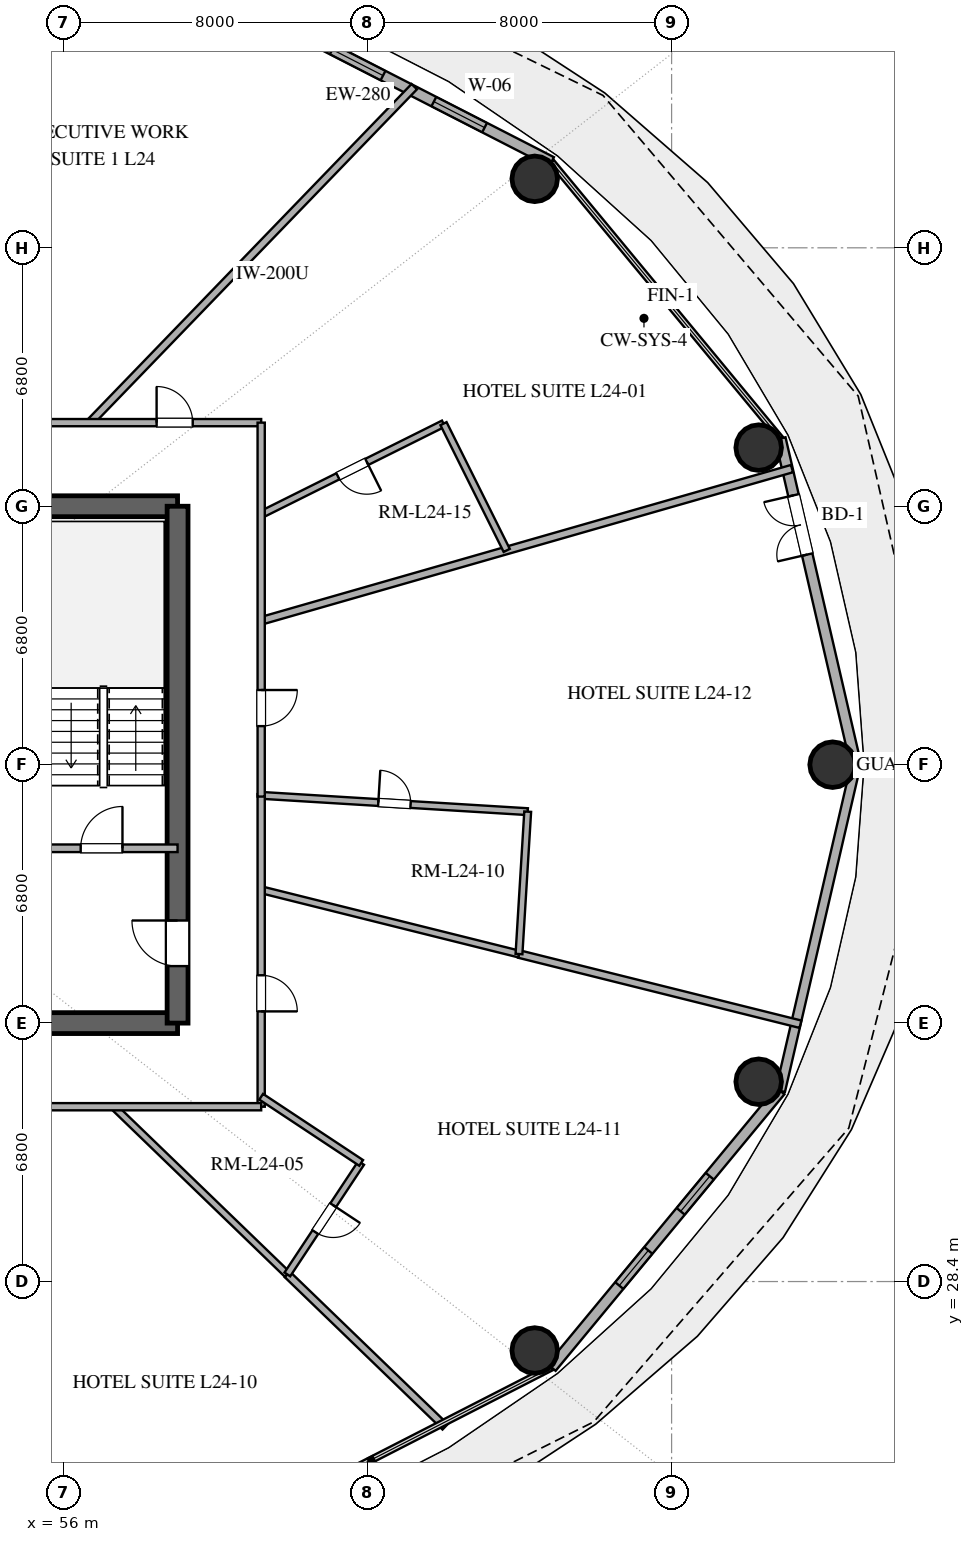
"""IFC4 building model, lengths in metres.
Left out: names, types, materials, properties, quantities, classifications, styles, units other than length and angle.
Written with IfcOpenShell. Run it as: python <this file> out.ifc"""

import sys

from ifc_helpers import new_model, si_unit, direction, frame, frame_2d, origin, origin_2d, place, context, subcontext, project, spatial, rectangle, hollow_circle, extrude, element, fill, save


model = new_model("IFC4")
c1 = context("Model", 3, precision=1e-05, world=origin(), true_north=direction((0.0, 1.0)))
c2 = subcontext(c1, "Body", "Model", "MODEL_VIEW")
j1 = project(units=[si_unit("LENGTHUNIT", "METRE"), si_unit("PLANEANGLEUNIT", "RADIAN")], contexts=[c1])
p1 = place(None, origin())
s1 = spatial("IfcSite", under=j1, at=p1, CompositionType="ELEMENT")
p2 = place(p1, origin())
s2 = spatial("IfcBuilding", under=s1, at=p2, CompositionType="ELEMENT")
p3 = place(p2, frame((0.0, 0.0, 98.4)))
s3 = spatial("IfcBuildingStorey", under=s2, at=p3, CompositionType="ELEMENT", Elevation=98.4)
for number, where, z_axis, x_axis in (
    (1, (55.0, 35.2, 0.0), (0.0, 0.0, 1.0), (1.0, 0.0, 0.0)),
    (2, (55.0, 48.8, 0.0), (0.0, 0.0, 1.0), (1.0, 0.0, 0.0)),
):
    element("IfcWall", number, at=place(p3, frame(where, z_axis=z_axis, x_axis=x_axis)), inside=s3, PredefinedType="SHEAR", context=c2, shape_type="SweptSolid", body=[
        extrude(rectangle(XDim=4.0, YDim=0.55, at=frame_2d((2.0, 0.0))), origin(), (0.0, 0.0, 1.0), 3.38),
    ])
p4 = place(p3, frame((59.0, 35.2, 0.0), z_axis=(0.0, 0.0, 1.0), x_axis=(0.0, 1.0, 0.0)))
e3 = element("IfcWall", 3, at=p4, inside=s3, PredefinedType="SHEAR", context=c2, shape_type="SweptSolid", body=[
    extrude(rectangle(XDim=13.6, YDim=0.55, at=frame_2d((6.8, 0.0))), origin(), (0.0, 0.0, 1.0), 3.38),
])
p5 = place(p4, frame((1.5, 0.0, 0.0)))
e4 = element("IfcOpeningElement", 4, at=p5, cuts=e3, PredefinedType="OPENING", context=c2, shape_type="SweptSolid", body=[
    extrude(rectangle(XDim=1.2, YDim=2.15, at=frame_2d((0.6, 1.075))), frame((0.0, 0.285, 0.0), z_axis=(0.0, -1.0, 0.0), x_axis=(1.0, 0.0, 0.0)), (0.0, 0.0, 1.0), 0.57),
])
for number, where, z_axis, x_axis in (
    (5, (76.237, 42.0, 0.0), (0.0, 0.0, 1.0), (1.0, 0.0, 0.0)),
    (6, (74.291, 50.343, 0.0), (0.0, 0.0, 1.0), (1.0, 0.0, 0.0)),
    (7, (68.398, 57.415, 0.0), (0.0, 0.0, 1.0), (1.0, 0.0, 0.0)),
    (8, (68.398, 26.585, 0.0), (0.0, 0.0, 1.0), (1.0, 0.0, 0.0)),
    (9, (74.291, 33.657, 0.0), (0.0, 0.0, 1.0), (1.0, 0.0, 0.0)),
):
    element("IfcColumn", number, at=place(p3, frame(where, z_axis=z_axis, x_axis=x_axis)), inside=s3, PredefinedType="COLUMN", context=c2, shape_type="SweptSolid", body=[
        extrude(hollow_circle(Radius=0.6, WallThickness=0.032, at=origin_2d()), origin(), (0.0, 0.0, 1.0), 3.38),
    ])
p6 = place(p3, frame((76.849, 42.0, 0.0), z_axis=(0.0, 0.0, 1.0), x_axis=(-0.22558597182, 0.974223264616, 0.0)))
e10 = element("IfcWall", 10, at=p6, inside=s3, PredefinedType="SOLIDWALL", context=c2, shape_type="SweptSolid", body=[
    extrude(rectangle(XDim=8.811, YDim=0.28, at=frame_2d((4.405, 0.0))), origin(), (0.0, 0.0, 1.0), 3.38),
])
p7 = place(p6, frame((5.675, 0.0, 0.0)))
e11 = element("IfcOpeningElement", 11, at=p7, cuts=e10, PredefinedType="OPENING", context=c2, shape_type="SweptSolid", body=[
    extrude(rectangle(XDim=1.6, YDim=2.25, at=frame_2d((0.8, 1.125))), frame((0.0, 0.15, 0.0), z_axis=(0.0, -1.0, 0.0), x_axis=(1.0, 0.0, 0.0)), (0.0, 0.0, 1.0), 0.3),
])
p8 = place(p3, frame((68.84, 57.86, 0.0), z_axis=(0.0, 0.0, 1.0), x_axis=(-0.889959505023, 0.45603955905, 0.0)))
e12 = element("IfcWall", 12, at=p8, inside=s3, PredefinedType="SOLIDWALL", context=c2, shape_type="SweptSolid", body=[
    extrude(rectangle(XDim=10.662, YDim=0.28, at=frame_2d((5.331, 0.0))), origin(), (0.0, 0.0, 1.0), 3.38),
])
p9 = place(p8, frame((1.979, 0.0, 0.85)))
e13 = element("IfcOpeningElement", 13, at=p9, cuts=e12, PredefinedType="OPENING", context=c2, shape_type="SweptSolid", body=[
    extrude(rectangle(XDim=1.5, YDim=2.0, at=frame_2d((0.75, 1.0))), frame((0.0, 0.15, 0.0), z_axis=(0.0, -1.0, 0.0), x_axis=(1.0, 0.0, 0.0)), (0.0, 0.0, 1.0), 0.3),
])
p10 = place(p8, frame((4.982, 0.0, 0.85)))
e14 = element("IfcOpeningElement", 14, at=p10, cuts=e12, PredefinedType="OPENING", context=c2, shape_type="SweptSolid", body=[
    extrude(rectangle(XDim=1.5, YDim=1.8, at=frame_2d((0.75, 0.9))), frame((0.0, 0.15, 0.0), z_axis=(0.0, -1.0, 0.0), x_axis=(1.0, 0.0, 0.0)), (0.0, 0.0, 1.0), 0.3),
])
p11 = place(p8, frame((7.096, 0.0, 0.85)))
e15 = element("IfcOpeningElement", 15, at=p11, cuts=e12, PredefinedType="OPENING", context=c2, shape_type="SweptSolid", body=[
    extrude(rectangle(XDim=1.5, YDim=1.8, at=frame_2d((0.75, 0.9))), frame((0.0, 0.15, 0.0), z_axis=(0.0, -1.0, 0.0), x_axis=(1.0, 0.0, 0.0)), (0.0, 0.0, 1.0), 0.3),
])
p12 = place(p3, frame((68.84, 26.14, 0.0), z_axis=(0.0, 0.0, 1.0), x_axis=(0.637505817448, 0.770445541696, 0.0)))
e16 = element("IfcWall", 16, at=p12, inside=s3, PredefinedType="SOLIDWALL", context=c2, shape_type="SweptSolid", body=[
    extrude(rectangle(XDim=9.445, YDim=0.28, at=frame_2d((4.723, 0.0))), origin(), (0.0, 0.0, 1.0), 3.38),
])
p13 = place(p12, frame((2.797, 0.0, 0.85)))
e17 = element("IfcOpeningElement", 17, at=p13, cuts=e16, PredefinedType="OPENING", context=c2, shape_type="SweptSolid", body=[
    extrude(rectangle(XDim=1.2, YDim=1.6, at=frame_2d((0.6, 0.8))), frame((0.0, 0.15, 0.0), z_axis=(0.0, -1.0, 0.0), x_axis=(1.0, 0.0, 0.0)), (0.0, 0.0, 1.0), 0.3),
])
p14 = place(p12, frame((5.332, 0.0, 0.85)))
e18 = element("IfcOpeningElement", 18, at=p14, cuts=e16, PredefinedType="OPENING", context=c2, shape_type="SweptSolid", body=[
    extrude(rectangle(XDim=1.2, YDim=1.6, at=frame_2d((0.6, 0.8))), frame((0.0, 0.15, 0.0), z_axis=(0.0, -1.0, 0.0), x_axis=(1.0, 0.0, 0.0)), (0.0, 0.0, 1.0), 0.3),
])
p15 = place(p3, frame((74.861, 33.417, 0.0), z_axis=(0.0, 0.0, 1.0), x_axis=(0.22558597182, 0.974223264616, 0.0)))
e19 = element("IfcWall", 19, at=p15, inside=s3, PredefinedType="SOLIDWALL", context=c2, shape_type="SweptSolid", body=[
    extrude(rectangle(XDim=8.811, YDim=0.25, at=frame_2d((4.405, 0.0))), origin(), (0.0, 0.0, 1.0), 3.38),
])
p16 = place(p3, frame((55.0, 39.8, 0.0), z_axis=(0.0, 0.0, 1.0), x_axis=(1.0, 0.0, 0.0)))
e20 = element("IfcWall", 20, at=p16, inside=s3, PredefinedType="SOLIDWALL", context=c2, shape_type="SweptSolid", body=[
    extrude(rectangle(XDim=4.0, YDim=0.2, at=frame_2d((2.0, 0.0))), origin(), (0.0, 0.0, 1.0), 2.74),
])
p17 = place(p16, frame((1.45, 0.0, 0.0)))
e21 = element("IfcOpeningElement", 21, at=p17, cuts=e20, PredefinedType="OPENING", context=c2, shape_type="SweptSolid", body=[
    extrude(rectangle(XDim=1.1, YDim=2.15, at=frame_2d((0.55, 1.075))), frame((0.0, 0.11, 0.0), z_axis=(0.0, -1.0, 0.0), x_axis=(1.0, 0.0, 0.0)), (0.0, 0.0, 1.0), 0.22),
])
p18 = place(p3, frame((65.228, 59.84, 0.0), z_axis=(0.0, 0.0, 1.0), x_axis=(-0.694672506389, -0.719326149161, 0.0)))
e22 = element("IfcWall", 22, at=p18, inside=s3, PredefinedType="PARTITIONING", context=c2, shape_type="SweptSolid", body=[
    extrude(rectangle(XDim=12.289, YDim=0.2, at=frame_2d((6.145, 0.0))), origin(), (0.0, 0.0, 1.0), 2.74),
])
p19 = place(p3, frame((61.2, 45.785, 0.0), z_axis=(0.0, 0.0, 1.0), x_axis=(0.961261030421, 0.275639676741, 0.0)))
e23 = element("IfcWall", 23, at=p19, inside=s3, PredefinedType="PARTITIONING", context=c2, shape_type="SweptSolid", body=[
    extrude(rectangle(XDim=14.531, YDim=0.2, at=frame_2d((7.266, 0.0))), origin(), (0.0, 0.0, 1.0), 2.74),
])
p20 = place(p3, frame((75.391, 35.171, 0.0), z_axis=(0.0, 0.0, 1.0), x_axis=(-0.970302209845, 0.241895889938, 0.0)))
e24 = element("IfcWall", 24, at=p20, inside=s3, PredefinedType="PARTITIONING", context=c2, shape_type="SweptSolid", body=[
    extrude(rectangle(XDim=7.633, YDim=0.2, at=frame_2d((3.817, 0.0))), origin(), (0.0, 0.0, 1.0), 2.74),
])
p21 = place(p3, frame((61.2, 41.193, 0.0), z_axis=(0.0, 0.0, 1.0), x_axis=(0.998134708281, -0.061050013314, 0.0)))
e25 = element("IfcWall", 25, at=p21, inside=s3, PredefinedType="PLUMBINGWALL", context=c2, shape_type="SweptSolid", body=[
    extrude(rectangle(XDim=7.026, YDim=0.18, at=frame_2d((3.513, 0.0))), origin(), (0.0, 0.0, 1.0), 2.74),
])
p22 = place(p21, frame((3.088, 0.0, 0.0)))
e26 = element("IfcOpeningElement", 26, at=p22, cuts=e25, PredefinedType="OPENING", context=c2, shape_type="SweptSolid", body=[
    extrude(rectangle(XDim=0.85, YDim=2.1, at=frame_2d((0.425, 1.05))), frame((0.0, 0.1, 0.0), z_axis=(0.0, -1.0, 0.0), x_axis=(1.0, 0.0, 0.0)), (0.0, 0.0, 1.0), 0.2),
])
p23 = place(p3, frame((67.984, 37.017, 0.0), z_axis=(0.0, 0.0, 1.0), x_axis=(-0.970290206094, 0.241944034764, 0.0)))
e27 = element("IfcWall", 27, at=p23, inside=s3, PredefinedType="PLUMBINGWALL", context=c2, shape_type="SweptSolid", body=[
    extrude(rectangle(XDim=6.992, YDim=0.18, at=frame_2d((3.496, 0.0))), origin(), (0.0, 0.0, 1.0), 2.74),
])
p24 = place(p3, frame((48.518, 51.0, 0.0), z_axis=(0.0, 0.0, 1.0), x_axis=(1.0, 0.0, 0.0)))
e28 = element("IfcWall", 28, at=p24, inside=s3, PredefinedType="PARTITIONING", context=c2, shape_type="SweptSolid", body=[
    extrude(rectangle(XDim=12.682, YDim=0.19, at=frame_2d((6.341, 0.0))), origin(), (0.0, 0.0, 1.0), 2.74),
])
p25 = place(p24, frame((4.455, 0.0, 0.0)))
e29 = element("IfcOpeningElement", 29, at=p25, cuts=e28, PredefinedType="OPENING", context=c2, shape_type="SweptSolid", body=[
    extrude(rectangle(XDim=1.0, YDim=2.2, at=frame_2d((0.5, 1.1))), frame((0.0, 0.105, 0.0), z_axis=(0.0, -1.0, 0.0), x_axis=(1.0, 0.0, 0.0)), (0.0, 0.0, 1.0), 0.21),
])
p26 = place(p24, frame((9.93, 0.0, 0.0)))
e30 = element("IfcOpeningElement", 30, at=p26, cuts=e28, PredefinedType="OPENING", context=c2, shape_type="SweptSolid", body=[
    extrude(rectangle(XDim=0.95, YDim=2.15, at=frame_2d((0.475, 1.075))), frame((0.0, 0.105, 0.0), z_axis=(0.0, -1.0, 0.0), x_axis=(1.0, 0.0, 0.0)), (0.0, 0.0, 1.0), 0.21),
])
p27 = place(p3, frame((61.889, 28.587, 0.0), z_axis=(0.0, 0.0, 1.0), x_axis=(-0.719318009274, 0.694680935059, 0.0)))
e31 = element("IfcWall", 31, at=p27, inside=s3, PredefinedType="PLUMBINGWALL", context=c2, shape_type="SweptSolid", body=[
    extrude(rectangle(XDim=6.352, YDim=0.18, at=frame_2d((3.176, 0.0))), origin(), (0.0, 0.0, 1.0), 2.74),
])
p28 = place(p3, frame((66.041, 24.578, 0.0), z_axis=(0.0, 0.0, 1.0), x_axis=(-0.719370121813, 0.694626970281, 0.0)))
e32 = element("IfcWall", 32, at=p28, inside=s3, PredefinedType="PARTITIONING", context=c2, shape_type="SweptSolid", body=[
    extrude(rectangle(XDim=5.772, YDim=0.2, at=frame_2d((2.886, 0.0))), origin(), (0.0, 0.0, 1.0), 2.74),
])
p29 = place(p3, frame((61.2, 41.225, 0.0), z_axis=(0.0, 0.0, 1.0), x_axis=(0.0, -1.0, 0.0)))
e33 = element("IfcWall", 33, at=p29, inside=s3, PredefinedType="PARTITIONING", context=c2, shape_type="SweptSolid", body=[
    extrude(rectangle(XDim=8.225, YDim=0.19, at=frame_2d((4.112, 0.0))), origin(), (0.0, 0.0, 1.0), 2.74),
])
p30 = place(p29, frame((4.767, 0.0, 0.0)))
e34 = element("IfcOpeningElement", 34, at=p30, cuts=e33, PredefinedType="OPENING", context=c2, shape_type="SweptSolid", body=[
    extrude(rectangle(XDim=0.95, YDim=2.15, at=frame_2d((0.475, 1.075))), frame((0.0, 0.105, 0.0), z_axis=(0.0, -1.0, 0.0), x_axis=(1.0, 0.0, 0.0)), (0.0, 0.0, 1.0), 0.21),
])
p31 = place(p3, frame((65.998, 50.973, 0.0), z_axis=(0.0, 0.0, 1.0), x_axis=(-0.894936648514, -0.446193226244, 0.0)))
e35 = element("IfcWall", 35, at=p31, inside=s3, PredefinedType="PLUMBINGWALL", context=c2, shape_type="SweptSolid", body=[
    extrude(rectangle(XDim=5.361, YDim=0.18, at=frame_2d((2.681, 0.0))), origin(), (0.0, 0.0, 1.0), 2.74),
])
p32 = place(p31, frame((2.256, 0.0, 0.0)))
e36 = element("IfcOpeningElement", 36, at=p32, cuts=e35, PredefinedType="OPENING", context=c2, shape_type="SweptSolid", body=[
    extrude(rectangle(XDim=0.85, YDim=2.1, at=frame_2d((0.425, 1.05))), frame((0.0, 0.1, 0.0), z_axis=(0.0, -1.0, 0.0), x_axis=(1.0, 0.0, 0.0)), (0.0, 0.0, 1.0), 0.2),
])
p33 = place(p3, frame((61.2, 33.0, 0.0), z_axis=(0.0, 0.0, 1.0), x_axis=(-1.0, 0.0, 0.0)))
e37 = element("IfcWall", 37, at=p33, inside=s3, PredefinedType="PARTITIONING", context=c2, shape_type="SweptSolid", body=[
    extrude(rectangle(XDim=10.653, YDim=0.19, at=frame_2d((5.326, 0.0))), origin(), (0.0, 0.0, 1.0), 2.74),
])
p34 = place(p33, frame((5.816, 0.0, 0.0)))
e38 = element("IfcOpeningElement", 38, at=p34, cuts=e37, PredefinedType="OPENING", context=c2, shape_type="SweptSolid", body=[
    extrude(rectangle(XDim=0.95, YDim=2.15, at=frame_2d((0.475, 1.075))), frame((0.0, 0.105, 0.0), z_axis=(0.0, -1.0, 0.0), x_axis=(1.0, 0.0, 0.0)), (0.0, 0.0, 1.0), 0.21),
])
p35 = place(p3, frame((61.2, 51.0, 0.0), z_axis=(0.0, 0.0, 1.0), x_axis=(0.0, -1.0, 0.0)))
e39 = element("IfcWall", 39, at=p35, inside=s3, PredefinedType="PARTITIONING", context=c2, shape_type="SweptSolid", body=[
    extrude(rectangle(XDim=9.839, YDim=0.19, at=frame_2d((4.92, 0.0))), origin(), (0.0, 0.0, 1.0), 2.74),
])
p36 = place(p35, frame((7.035, 0.0, 0.0)))
e40 = element("IfcOpeningElement", 40, at=p36, cuts=e39, PredefinedType="OPENING", context=c2, shape_type="SweptSolid", body=[
    extrude(rectangle(XDim=0.95, YDim=2.15, at=frame_2d((0.475, 1.075))), frame((0.0, 0.105, 0.0), z_axis=(0.0, -1.0, 0.0), x_axis=(1.0, 0.0, 0.0)), (0.0, 0.0, 1.0), 0.21),
])
p37 = place(p3, frame((68.213, 40.764, 0.0), z_axis=(0.0, 0.0, 1.0), x_axis=(-0.061013519028, -0.998136939751, 0.0)))
e41 = element("IfcWall", 41, at=p37, inside=s3, PredefinedType="PLUMBINGWALL", context=c2, shape_type="SweptSolid", body=[
    extrude(rectangle(XDim=3.753, YDim=0.18, at=frame_2d((1.877, 0.0))), origin(), (0.0, 0.0, 1.0), 2.74),
])
p38 = place(p3, frame((67.661, 47.638, 0.0), z_axis=(0.0, 0.0, 1.0), x_axis=(-0.446243949247, 0.894911357488, 0.0)))
e42 = element("IfcWall", 42, at=p38, inside=s3, PredefinedType="PLUMBINGWALL", context=c2, shape_type="SweptSolid", body=[
    extrude(rectangle(XDim=3.727, YDim=0.18, at=frame_2d((1.864, 0.0))), origin(), (0.0, 0.0, 1.0), 2.74),
])
p39 = place(p3, frame((63.831, 31.521, 0.0), z_axis=(0.0, 0.0, 1.0), x_axis=(-0.551959146688, -0.833871153349, 0.0)))
e43 = element("IfcWall", 43, at=p39, inside=s3, PredefinedType="PLUMBINGWALL", context=c2, shape_type="SweptSolid", body=[
    extrude(rectangle(XDim=3.519, YDim=0.18, at=frame_2d((1.759, 0.0))), origin(), (0.0, 0.0, 1.0), 2.74),
])
p40 = place(p39, frame((1.334, 0.0, 0.0)))
e44 = element("IfcOpeningElement", 44, at=p40, cuts=e43, PredefinedType="OPENING", context=c2, shape_type="SweptSolid", body=[
    extrude(rectangle(XDim=0.85, YDim=2.1, at=frame_2d((0.425, 1.05))), frame((0.0, 0.1, 0.0), z_axis=(0.0, -1.0, 0.0), x_axis=(1.0, 0.0, 0.0)), (0.0, 0.0, 1.0), 0.2),
])
p41 = place(p3, frame((61.2, 33.263, 0.0), z_axis=(0.0, 0.0, 1.0), x_axis=(0.833855219674, -0.5519832177, 0.0)))
e45 = element("IfcWall", 45, at=p41, inside=s3, PredefinedType="PLUMBINGWALL", context=c2, shape_type="SweptSolid", body=[
    extrude(rectangle(XDim=3.155, YDim=0.18, at=frame_2d((1.578, 0.0))), origin(), (0.0, 0.0, 1.0), 2.74),
])
p42 = place(p7, origin())
e46 = element("IfcDoor", 46, at=p42, inside=s3, OperationType="DOUBLE_DOOR_SINGLE_SWING", PredefinedType="DOOR", context=c2, shape_type="SweptSolid", body=[
    extrude(rectangle(XDim=1.6, YDim=2.25, at=frame_2d((0.8, 1.125))), frame((0.0, 0.025, 0.0), z_axis=(0.0, -1.0, 0.0), x_axis=(1.0, 0.0, 0.0)), (0.0, 0.0, 1.0), 0.05),
])
fill(e11, e46)
p43 = place(p9, origin())
e47 = element("IfcWindow", 47, at=p43, inside=s3, PartitioningType="SINGLE_PANEL", PredefinedType="WINDOW", context=c2, shape_type="SweptSolid", body=[
    extrude(rectangle(XDim=1.5, YDim=2.0, at=frame_2d((0.75, 1.0))), frame((0.0, 0.03, 0.0), z_axis=(0.0, -1.0, 0.0), x_axis=(1.0, 0.0, 0.0)), (0.0, 0.0, 1.0), 0.06),
])
fill(e13, e47)
p44 = place(p10, origin())
e48 = element("IfcWindow", 48, at=p44, inside=s3, PartitioningType="SINGLE_PANEL", PredefinedType="WINDOW", context=c2, shape_type="SweptSolid", body=[
    extrude(rectangle(XDim=1.5, YDim=1.8, at=frame_2d((0.75, 0.9))), frame((0.0, 0.03, 0.0), z_axis=(0.0, -1.0, 0.0), x_axis=(1.0, 0.0, 0.0)), (0.0, 0.0, 1.0), 0.06),
])
fill(e14, e48)
p45 = place(p13, origin())
e49 = element("IfcWindow", 49, at=p45, inside=s3, PartitioningType="SINGLE_PANEL", PredefinedType="WINDOW", context=c2, shape_type="SweptSolid", body=[
    extrude(rectangle(XDim=1.2, YDim=1.6, at=frame_2d((0.6, 0.8))), frame((0.0, 0.03, 0.0), z_axis=(0.0, -1.0, 0.0), x_axis=(1.0, 0.0, 0.0)), (0.0, 0.0, 1.0), 0.06),
])
fill(e17, e49)
p46 = place(p14, origin())
e50 = element("IfcWindow", 50, at=p46, inside=s3, PartitioningType="SINGLE_PANEL", PredefinedType="WINDOW", context=c2, shape_type="SweptSolid", body=[
    extrude(rectangle(XDim=1.2, YDim=1.6, at=frame_2d((0.6, 0.8))), frame((0.0, 0.03, 0.0), z_axis=(0.0, -1.0, 0.0), x_axis=(1.0, 0.0, 0.0)), (0.0, 0.0, 1.0), 0.06),
])
fill(e18, e50)
p47 = place(p5, origin())
e51 = element("IfcDoor", 51, at=p47, inside=s3, OperationType="SINGLE_SWING_RIGHT", PredefinedType="DOOR", context=c2, shape_type="SweptSolid", body=[
    extrude(rectangle(XDim=1.2, YDim=2.15, at=frame_2d((0.6, 1.075))), frame((0.0, 0.025, 0.0), z_axis=(0.0, -1.0, 0.0), x_axis=(1.0, 0.0, 0.0)), (0.0, 0.0, 1.0), 0.05),
])
fill(e4, e51)
p48 = place(p17, origin())
e52 = element("IfcDoor", 52, at=p48, inside=s3, OperationType="SINGLE_SWING_RIGHT", PredefinedType="DOOR", context=c2, shape_type="SweptSolid", body=[
    extrude(rectangle(XDim=1.1, YDim=2.15, at=frame_2d((0.55, 1.075))), frame((0.0, 0.025, 0.0), z_axis=(0.0, -1.0, 0.0), x_axis=(1.0, 0.0, 0.0)), (0.0, 0.0, 1.0), 0.05),
])
fill(e21, e52)
p49 = place(p22, origin())
e53 = element("IfcDoor", 53, at=p49, inside=s3, OperationType="SINGLE_SWING_LEFT", PredefinedType="DOOR", context=c2, shape_type="SweptSolid", body=[
    extrude(rectangle(XDim=0.85, YDim=2.1, at=frame_2d((0.425, 1.05))), frame((0.0, 0.025, 0.0), z_axis=(0.0, -1.0, 0.0), x_axis=(1.0, 0.0, 0.0)), (0.0, 0.0, 1.0), 0.05),
])
fill(e26, e53)
p50 = place(p26, origin())
e54 = element("IfcDoor", 54, at=p50, inside=s3, OperationType="SINGLE_SWING_LEFT", PredefinedType="DOOR", context=c2, shape_type="SweptSolid", body=[
    extrude(rectangle(XDim=0.95, YDim=2.15, at=frame_2d((0.475, 1.075))), frame((0.0, 0.025, 0.0), z_axis=(0.0, -1.0, 0.0), x_axis=(1.0, 0.0, 0.0)), (0.0, 0.0, 1.0), 0.05),
])
fill(e30, e54)
p51 = place(p30, origin())
e55 = element("IfcDoor", 55, at=p51, inside=s3, OperationType="SINGLE_SWING_RIGHT", PredefinedType="DOOR", context=c2, shape_type="SweptSolid", body=[
    extrude(rectangle(XDim=0.95, YDim=2.15, at=frame_2d((0.475, 1.075))), frame((0.0, 0.025, 0.0), z_axis=(0.0, -1.0, 0.0), x_axis=(1.0, 0.0, 0.0)), (0.0, 0.0, 1.0), 0.05),
])
fill(e34, e55)
p52 = place(p32, origin())
e56 = element("IfcDoor", 56, at=p52, inside=s3, OperationType="SINGLE_SWING_LEFT", PredefinedType="DOOR", context=c2, shape_type="SweptSolid", body=[
    extrude(rectangle(XDim=0.85, YDim=2.1, at=frame_2d((0.425, 1.05))), frame((0.0, 0.025, 0.0), z_axis=(0.0, -1.0, 0.0), x_axis=(1.0, 0.0, 0.0)), (0.0, 0.0, 1.0), 0.05),
])
fill(e36, e56)
p53 = place(p36, origin())
e57 = element("IfcDoor", 57, at=p53, inside=s3, OperationType="SINGLE_SWING_LEFT", PredefinedType="DOOR", context=c2, shape_type="SweptSolid", body=[
    extrude(rectangle(XDim=0.95, YDim=2.15, at=frame_2d((0.475, 1.075))), frame((0.0, 0.025, 0.0), z_axis=(0.0, -1.0, 0.0), x_axis=(1.0, 0.0, 0.0)), (0.0, 0.0, 1.0), 0.05),
])
fill(e40, e57)
p54 = place(p40, origin())
e58 = element("IfcDoor", 58, at=p54, inside=s3, OperationType="SINGLE_SWING_LEFT", PredefinedType="DOOR", context=c2, shape_type="SweptSolid", body=[
    extrude(rectangle(XDim=0.85, YDim=2.1, at=frame_2d((0.425, 1.05))), frame((0.0, 0.025, 0.0), z_axis=(0.0, -1.0, 0.0), x_axis=(1.0, 0.0, 0.0)), (0.0, 0.0, 1.0), 0.05),
])
fill(e44, e58)
save(model, sys.argv[1])
